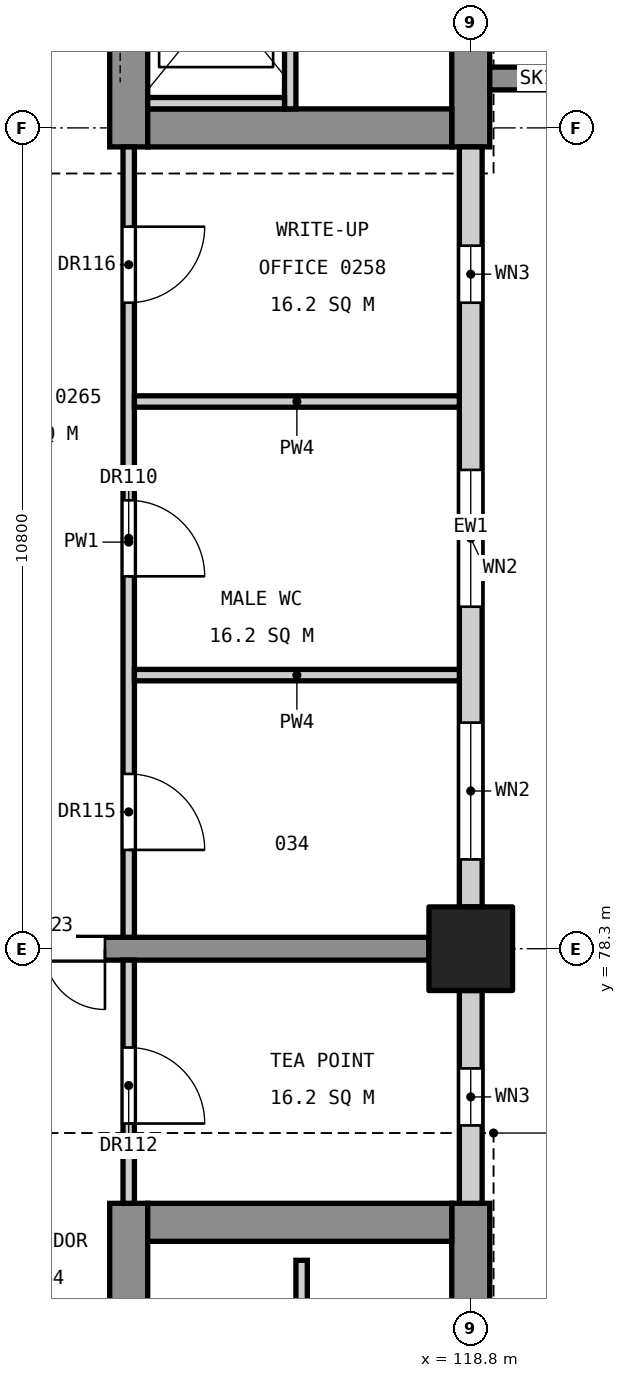
"""IFC4 building model, lengths in metres.
Left out: names, types, materials, properties, quantities, classifications, styles, units other than length and angle.
Written with IfcOpenShell. Run it as: python <this file> out.ifc"""

import sys

from ifc_helpers import new_model, si_unit, direction, frame, frame_2d, origin, origin_2d, place, context, subcontext, project, spatial, rectangle, extrude, element, fill, save


model = new_model("IFC4")
c1 = context("Model", 3, precision=1e-05, world=origin(), true_north=direction((0.0, 1.0)))
c2 = subcontext(c1, "Body", "Model", "MODEL_VIEW")
j1 = project(units=[si_unit("LENGTHUNIT", "METRE"), si_unit("PLANEANGLEUNIT", "RADIAN")], contexts=[c1])
p1 = place(None, origin())
s1 = spatial("IfcSite", under=j1, at=p1, CompositionType="ELEMENT")
p2 = place(p1, origin())
s2 = spatial("IfcBuilding", under=s1, at=p2, CompositionType="ELEMENT")
p3 = place(p2, frame((0.0, 0.0, 11.4)))
s3 = spatial("IfcBuildingStorey", under=s2, at=p3, CompositionType="ELEMENT", Elevation=11.4)
p4 = place(p3, frame((118.8, 78.3, 0.0), z_axis=(0.0, 0.0, 1.0), x_axis=(1.0, 0.0, 0.0)))
e1 = element("IfcColumn", 1, at=p4, inside=s3, PredefinedType="COLUMN", context=c2, shape_type="SweptSolid", body=[
    extrude(rectangle(XDim=1.1, YDim=1.1, at=origin_2d()), origin(), (0.0, 0.0, 1.0), 5.4),
])
p5 = place(p3, frame((118.8, 60.05, 0.0), z_axis=(0.0, 0.0, 1.0), x_axis=(0.0, 1.0, 0.0)))
e2 = element("IfcWall", 2, at=p5, inside=s3, PredefinedType="SHEAR", context=c2, shape_type="SweptSolid", body=[
    extrude(rectangle(XDim=14.9, YDim=0.5, at=frame_2d((7.45, 0.0))), origin(), (0.0, 0.0, 1.0), 5.1),
])
p6 = place(p5, frame((6.3, 0.0, 3.4)))
e3 = element("IfcOpeningElement", 3, at=p6, cuts=e2, PredefinedType="OPENING", context=c2, shape_type="SweptSolid", body=[
    extrude(rectangle(XDim=1.2, YDim=0.9, at=frame_2d((0.6, 0.45))), frame((0.0, 0.26, 0.0), z_axis=(0.0, -1.0, 0.0), x_axis=(1.0, 0.0, 0.0)), (0.0, 0.0, 1.0), 0.52),
])
p7 = place(p3, frame((114.3, 60.05, 0.0), z_axis=(0.0, 0.0, 1.0), x_axis=(0.0, 1.0, 0.0)))
e4 = element("IfcWall", 4, at=p7, inside=s3, PredefinedType="SHEAR", context=c2, shape_type="SweptSolid", body=[
    extrude(rectangle(XDim=14.9, YDim=0.5, at=frame_2d((7.45, 0.0))), origin(), (0.0, 0.0, 1.0), 5.1),
])
p8 = place(p7, frame((0.55, 0.0, 0.0)))
e5 = element("IfcOpeningElement", 5, at=p8, cuts=e4, PredefinedType="OPENING", context=c2, shape_type="SweptSolid", body=[
    extrude(rectangle(XDim=1.4, YDim=2.1, at=frame_2d((0.7, 1.05))), frame((0.0, 0.26, 0.0), z_axis=(0.0, -1.0, 0.0), x_axis=(1.0, 0.0, 0.0)), (0.0, 0.0, 1.0), 0.52),
])
p9 = place(p7, frame((8.85, 0.0, 0.0)))
e6 = element("IfcOpeningElement", 6, at=p9, cuts=e4, PredefinedType="OPENING", context=c2, shape_type="SweptSolid", body=[
    extrude(rectangle(XDim=1.1, YDim=2.1, at=frame_2d((0.55, 1.05))), frame((0.0, 0.26, 0.0), z_axis=(0.0, -1.0, 0.0), x_axis=(1.0, 0.0, 0.0)), (0.0, 0.0, 1.0), 0.52),
])
p10 = place(p7, frame((11.4, 0.0, 0.0)))
e7 = element("IfcOpeningElement", 7, at=p10, cuts=e4, PredefinedType="OPENING", context=c2, shape_type="SweptSolid", body=[
    extrude(rectangle(XDim=1.1, YDim=2.1, at=frame_2d((0.55, 1.05))), frame((0.0, 0.26, 0.0), z_axis=(0.0, -1.0, 0.0), x_axis=(1.0, 0.0, 0.0)), (0.0, 0.0, 1.0), 0.52),
])
p11 = place(p3, frame((118.55, 74.7, 0.0), z_axis=(0.0, 0.0, 1.0), x_axis=(-1.0, 0.0, 0.0)))
e8 = element("IfcWall", 8, at=p11, inside=s3, PredefinedType="SHEAR", context=c2, shape_type="SweptSolid", body=[
    extrude(rectangle(XDim=4.0, YDim=0.5, at=frame_2d((2.0, 0.0))), origin(), (0.0, 0.0, 1.0), 5.1),
])
p12 = place(p3, frame((118.8, 88.85, 0.0), z_axis=(0.0, 0.0, 1.0), x_axis=(0.0, 1.0, 0.0)))
e9 = element("IfcWall", 9, at=p12, inside=s3, PredefinedType="SHEAR", context=c2, shape_type="SweptSolid", body=[
    extrude(rectangle(XDim=11.3, YDim=0.5, at=frame_2d((5.65, 0.0))), origin(), (0.0, 0.0, 1.0), 5.1),
])
p13 = place(p12, frame((3.8, 0.0, 3.4)))
e10 = element("IfcOpeningElement", 10, at=p13, cuts=e9, PredefinedType="OPENING", context=c2, shape_type="SweptSolid", body=[
    extrude(rectangle(XDim=1.2, YDim=0.9, at=frame_2d((0.6, 0.45))), frame((0.0, 0.26, 0.0), z_axis=(0.0, -1.0, 0.0), x_axis=(1.0, 0.0, 0.0)), (0.0, 0.0, 1.0), 0.52),
])
p14 = place(p3, frame((114.3, 88.85, 0.0), z_axis=(0.0, 0.0, 1.0), x_axis=(0.0, 1.0, 0.0)))
e11 = element("IfcWall", 11, at=p14, inside=s3, PredefinedType="SHEAR", context=c2, shape_type="SweptSolid", body=[
    extrude(rectangle(XDim=11.3, YDim=0.5, at=frame_2d((5.65, 0.0))), origin(), (0.0, 0.0, 1.0), 5.1),
])
p15 = place(p14, frame((9.35, 0.0, 0.0)))
e12 = element("IfcOpeningElement", 12, at=p15, cuts=e11, PredefinedType="OPENING", context=c2, shape_type="SweptSolid", body=[
    extrude(rectangle(XDim=1.4, YDim=2.1, at=frame_2d((0.7, 1.05))), frame((0.0, 0.26, 0.0), z_axis=(0.0, -1.0, 0.0), x_axis=(1.0, 0.0, 0.0)), (0.0, 0.0, 1.0), 0.52),
])
p16 = place(p14, frame((1.4, 0.0, 0.0)))
e13 = element("IfcOpeningElement", 13, at=p16, cuts=e11, PredefinedType="OPENING", context=c2, shape_type="SweptSolid", body=[
    extrude(rectangle(XDim=1.1, YDim=2.1, at=frame_2d((0.55, 1.05))), frame((0.0, 0.26, 0.0), z_axis=(0.0, -1.0, 0.0), x_axis=(1.0, 0.0, 0.0)), (0.0, 0.0, 1.0), 0.52),
])
p17 = place(p3, frame((118.55, 89.1, 0.0), z_axis=(0.0, 0.0, 1.0), x_axis=(-1.0, 0.0, 0.0)))
e14 = element("IfcWall", 14, at=p17, inside=s3, PredefinedType="SHEAR", context=c2, shape_type="SweptSolid", body=[
    extrude(rectangle(XDim=4.0, YDim=0.5, at=frame_2d((2.0, 0.0))), origin(), (0.0, 0.0, 1.0), 5.1),
])
p18 = place(p3, frame((119.05, 89.75, 0.0), z_axis=(0.0, 0.0, 1.0), x_axis=(1.0, 0.0, 0.0)))
e15 = element("IfcWall", 15, at=p18, inside=s3, PredefinedType="SHEAR", context=c2, shape_type="SweptSolid", body=[
    extrude(rectangle(XDim=1.25, YDim=0.3, at=frame_2d((0.625, 0.0))), origin(), (0.0, 0.0, 1.0), 5.4),
])
p19 = place(p3, frame((118.25, 78.3, 0.0), z_axis=(0.0, 0.0, 1.0), x_axis=(-1.0, 0.0, 0.0)))
e16 = element("IfcWall", 16, at=p19, inside=s3, PredefinedType="SHEAR", context=c2, shape_type="SweptSolid", body=[
    extrude(rectangle(XDim=6.1, YDim=0.3, at=frame_2d((3.05, 0.0))), origin(), (0.0, 0.0, 1.0), 5.1),
])
p20 = place(p19, frame((4.262, 0.0, 0.0)))
e17 = element("IfcOpeningElement", 17, at=p20, cuts=e16, PredefinedType="OPENING", context=c2, shape_type="SweptSolid", body=[
    extrude(rectangle(XDim=1.6, YDim=2.1, at=frame_2d((0.8, 1.05))), frame((0.0, 0.16, 0.0), z_axis=(0.0, -1.0, 0.0), x_axis=(1.0, 0.0, 0.0)), (0.0, 0.0, 1.0), 0.32),
])
p21 = place(p3, frame((116.425, 92.0, 0.0), z_axis=(0.0, 0.0, 1.0), x_axis=(0.0, -1.0, 0.0)))
e18 = element("IfcWall", 18, at=p21, inside=s3, PredefinedType="SOLIDWALL", context=c2, shape_type="SweptSolid", body=[
    extrude(rectangle(XDim=2.65, YDim=0.15, at=frame_2d((1.325, 0.0))), origin(), (0.0, 0.0, 1.0), 5.4),
])
p22 = place(p3, frame((116.35, 89.425, 0.0), z_axis=(0.0, 0.0, 1.0), x_axis=(-1.0, 0.0, 0.0)))
e19 = element("IfcWall", 19, at=p22, inside=s3, PredefinedType="SOLIDWALL", context=c2, shape_type="SweptSolid", body=[
    extrude(rectangle(XDim=1.8, YDim=0.15, at=frame_2d((0.9, 0.0))), origin(), (0.0, 0.0, 1.0), 5.4),
])
p23 = place(p3, frame((116.575, 73.3, 0.0), z_axis=(0.0, 0.0, 1.0), x_axis=(0.0, 1.0, 0.0)))
e20 = element("IfcWall", 20, at=p23, inside=s3, PredefinedType="SOLIDWALL", context=c2, shape_type="SweptSolid", body=[
    extrude(rectangle(XDim=0.9, YDim=0.15, at=frame_2d((0.45, 0.0))), origin(), (0.0, 0.0, 1.0), 5.4),
])
p24 = place(p3, frame((118.8, 74.95, 0.0), z_axis=(0.0, 0.0, 1.0), x_axis=(0.0, 1.0, 0.0)))
e21 = element("IfcWall", 21, at=p24, inside=s3, PredefinedType="STANDARD", context=c2, shape_type="SweptSolid", body=[
    extrude(rectangle(XDim=2.8, YDim=0.3, at=frame_2d((1.4, 0.0))), origin(), (0.0, 0.0, 1.0), 4.1),
])
p25 = place(p24, frame((1.025, 0.0, 0.8)))
e22 = element("IfcOpeningElement", 22, at=p25, cuts=e21, PredefinedType="OPENING", context=c2, shape_type="SweptSolid", body=[
    extrude(rectangle(XDim=0.75, YDim=1.2, at=frame_2d((0.375, 0.6))), frame((0.0, 0.16, 0.0), z_axis=(0.0, -1.0, 0.0), x_axis=(1.0, 0.0, 0.0)), (0.0, 0.0, 1.0), 0.32),
])
p26 = place(p3, frame((118.8, 78.85, 0.0), z_axis=(0.0, 0.0, 1.0), x_axis=(0.0, 1.0, 0.0)))
e23 = element("IfcWall", 23, at=p26, inside=s3, PredefinedType="STANDARD", context=c2, shape_type="SweptSolid", body=[
    extrude(rectangle(XDim=10.0, YDim=0.3, at=frame_2d((5.0, 0.0))), origin(), (0.0, 0.0, 1.0), 4.1),
])
p27 = place(p26, frame((0.625, 0.0, 0.9)))
e24 = element("IfcOpeningElement", 24, at=p27, cuts=e23, PredefinedType="OPENING", context=c2, shape_type="SweptSolid", body=[
    extrude(rectangle(XDim=1.8, YDim=3.0, at=frame_2d((0.9, 1.5))), frame((0.0, 0.16, 0.0), z_axis=(0.0, -1.0, 0.0), x_axis=(1.0, 0.0, 0.0)), (0.0, 0.0, 1.0), 0.32),
])
p28 = place(p26, frame((3.95, 0.0, 0.9)))
e25 = element("IfcOpeningElement", 25, at=p28, cuts=e23, PredefinedType="OPENING", context=c2, shape_type="SweptSolid", body=[
    extrude(rectangle(XDim=1.8, YDim=3.0, at=frame_2d((0.9, 1.5))), frame((0.0, 0.16, 0.0), z_axis=(0.0, -1.0, 0.0), x_axis=(1.0, 0.0, 0.0)), (0.0, 0.0, 1.0), 0.32),
])
p29 = place(p26, frame((7.95, 0.0, 0.8)))
e26 = element("IfcOpeningElement", 26, at=p29, cuts=e23, PredefinedType="OPENING", context=c2, shape_type="SweptSolid", body=[
    extrude(rectangle(XDim=0.75, YDim=1.2, at=frame_2d((0.375, 0.6))), frame((0.0, 0.16, 0.0), z_axis=(0.0, -1.0, 0.0), x_axis=(1.0, 0.0, 0.0)), (0.0, 0.0, 1.0), 0.32),
])
p30 = place(p3, frame((114.3, 74.95, 0.0), z_axis=(0.0, 0.0, 1.0), x_axis=(0.0, 1.0, 0.0)))
e27 = element("IfcWall", 27, at=p30, inside=s3, PredefinedType="PARTITIONING", context=c2, shape_type="SweptSolid", body=[
    extrude(rectangle(XDim=3.2, YDim=0.15, at=frame_2d((1.6, 0.0))), origin(), (0.0, 0.0, 1.0), 4.0),
])
p31 = place(p30, frame((1.05, 0.0, 0.0)))
e28 = element("IfcOpeningElement", 28, at=p31, cuts=e27, PredefinedType="OPENING", context=c2, shape_type="SweptSolid", body=[
    extrude(rectangle(XDim=1.0, YDim=2.1, at=frame_2d((0.5, 1.05))), frame((0.0, 0.085, 0.0), z_axis=(0.0, -1.0, 0.0), x_axis=(1.0, 0.0, 0.0)), (0.0, 0.0, 1.0), 0.17),
])
p32 = place(p3, frame((114.3, 78.45, 0.0), z_axis=(0.0, 0.0, 1.0), x_axis=(0.0, 1.0, 0.0)))
e29 = element("IfcWall", 29, at=p32, inside=s3, PredefinedType="PARTITIONING", context=c2, shape_type="SweptSolid", body=[
    extrude(rectangle(XDim=10.4, YDim=0.15, at=frame_2d((5.2, 0.0))), origin(), (0.0, 0.0, 1.0), 4.0),
])
p33 = place(p32, frame((4.75, 0.0, 0.0)))
e30 = element("IfcOpeningElement", 30, at=p33, cuts=e29, PredefinedType="OPENING", context=c2, shape_type="SweptSolid", body=[
    extrude(rectangle(XDim=1.0, YDim=2.1, at=frame_2d((0.5, 1.05))), frame((0.0, 0.085, 0.0), z_axis=(0.0, -1.0, 0.0), x_axis=(1.0, 0.0, 0.0)), (0.0, 0.0, 1.0), 0.17),
])
p34 = place(p32, frame((1.15, 0.0, 0.0)))
e31 = element("IfcOpeningElement", 31, at=p34, cuts=e29, PredefinedType="OPENING", context=c2, shape_type="SweptSolid", body=[
    extrude(rectangle(XDim=1.0, YDim=2.1, at=frame_2d((0.5, 1.05))), frame((0.0, 0.085, 0.0), z_axis=(0.0, -1.0, 0.0), x_axis=(1.0, 0.0, 0.0)), (0.0, 0.0, 1.0), 0.17),
])
p35 = place(p32, frame((8.35, 0.0, 0.0)))
e32 = element("IfcOpeningElement", 32, at=p35, cuts=e29, PredefinedType="OPENING", context=c2, shape_type="SweptSolid", body=[
    extrude(rectangle(XDim=1.0, YDim=2.1, at=frame_2d((0.5, 1.05))), frame((0.0, 0.085, 0.0), z_axis=(0.0, -1.0, 0.0), x_axis=(1.0, 0.0, 0.0)), (0.0, 0.0, 1.0), 0.17),
])
for number, where, z_axis, x_axis in (
    (33, (118.65, 81.9, 0.0), (0.0, 0.0, 1.0), (-1.0, 0.0, 0.0)),
    (34, (118.65, 85.5, 0.0), (0.0, 0.0, 1.0), (-1.0, 0.0, 0.0)),
):
    element("IfcWall", number, at=place(p3, frame(where, z_axis=z_axis, x_axis=x_axis)), inside=s3, PredefinedType="PARTITIONING", context=c2, shape_type="SweptSolid", body=[
        extrude(rectangle(XDim=4.275, YDim=0.15, at=frame_2d((2.137, 0.0))), origin(), (0.0, 0.0, 1.0), 4.3),
    ])
p36 = place(p25, origin())
e35 = element("IfcWindow", 35, at=p36, inside=s3, PartitioningType="SINGLE_PANEL", PredefinedType="WINDOW", context=c2, shape_type="SweptSolid", body=[
    extrude(rectangle(XDim=0.75, YDim=1.2, at=frame_2d((0.375, 0.6))), frame((0.0, 0.03, 0.0), z_axis=(0.0, -1.0, 0.0), x_axis=(1.0, 0.0, 0.0)), (0.0, 0.0, 1.0), 0.06),
])
fill(e22, e35)
p37 = place(p27, origin())
e36 = element("IfcWindow", 36, at=p37, inside=s3, PartitioningType="SINGLE_PANEL", PredefinedType="WINDOW", context=c2, shape_type="SweptSolid", body=[
    extrude(rectangle(XDim=1.8, YDim=3.0, at=frame_2d((0.9, 1.5))), frame((0.0, 0.03, 0.0), z_axis=(0.0, -1.0, 0.0), x_axis=(1.0, 0.0, 0.0)), (0.0, 0.0, 1.0), 0.06),
])
fill(e24, e36)
p38 = place(p28, origin())
e37 = element("IfcWindow", 37, at=p38, inside=s3, PartitioningType="SINGLE_PANEL", PredefinedType="WINDOW", context=c2, shape_type="SweptSolid", body=[
    extrude(rectangle(XDim=1.8, YDim=3.0, at=frame_2d((0.9, 1.5))), frame((0.0, 0.03, 0.0), z_axis=(0.0, -1.0, 0.0), x_axis=(1.0, 0.0, 0.0)), (0.0, 0.0, 1.0), 0.06),
])
fill(e25, e37)
p39 = place(p29, origin())
e38 = element("IfcWindow", 38, at=p39, inside=s3, PartitioningType="SINGLE_PANEL", PredefinedType="WINDOW", context=c2, shape_type="SweptSolid", body=[
    extrude(rectangle(XDim=0.75, YDim=1.2, at=frame_2d((0.375, 0.6))), frame((0.0, 0.03, 0.0), z_axis=(0.0, -1.0, 0.0), x_axis=(1.0, 0.0, 0.0)), (0.0, 0.0, 1.0), 0.06),
])
fill(e26, e38)
p40 = place(p33, frame((1.0, 0.0, 0.0), z_axis=(0.0, 0.0, 1.0), x_axis=(-1.0, 0.0, 0.0)))
e39 = element("IfcDoor", 39, at=p40, inside=s3, OperationType="SINGLE_SWING_RIGHT", PredefinedType="DOOR", context=c2, shape_type="SweptSolid", body=[
    extrude(rectangle(XDim=1.0, YDim=2.1, at=frame_2d((0.5, 1.05))), frame((0.0, 0.025, 0.0), z_axis=(0.0, -1.0, 0.0), x_axis=(1.0, 0.0, 0.0)), (0.0, 0.0, 1.0), 0.05),
])
fill(e30, e39)
p41 = place(p31, frame((1.0, 0.0, 0.0), z_axis=(0.0, 0.0, 1.0), x_axis=(-1.0, 0.0, 0.0)))
e40 = element("IfcDoor", 40, at=p41, inside=s3, OperationType="SINGLE_SWING_RIGHT", PredefinedType="DOOR", context=c2, shape_type="SweptSolid", body=[
    extrude(rectangle(XDim=1.0, YDim=2.1, at=frame_2d((0.5, 1.05))), frame((0.0, 0.025, 0.0), z_axis=(0.0, -1.0, 0.0), x_axis=(1.0, 0.0, 0.0)), (0.0, 0.0, 1.0), 0.05),
])
fill(e28, e40)
p42 = place(p34, frame((1.0, 0.0, 0.0), z_axis=(0.0, 0.0, 1.0), x_axis=(-1.0, 0.0, 0.0)))
e41 = element("IfcDoor", 41, at=p42, inside=s3, OperationType="SINGLE_SWING_RIGHT", PredefinedType="DOOR", context=c2, shape_type="SweptSolid", body=[
    extrude(rectangle(XDim=1.0, YDim=2.1, at=frame_2d((0.5, 1.05))), frame((0.0, 0.025, 0.0), z_axis=(0.0, -1.0, 0.0), x_axis=(1.0, 0.0, 0.0)), (0.0, 0.0, 1.0), 0.05),
])
fill(e31, e41)
p43 = place(p35, frame((1.0, 0.0, 0.0), z_axis=(0.0, 0.0, 1.0), x_axis=(-1.0, 0.0, 0.0)))
e42 = element("IfcDoor", 42, at=p43, inside=s3, OperationType="SINGLE_SWING_LEFT", PredefinedType="DOOR", context=c2, shape_type="SweptSolid", body=[
    extrude(rectangle(XDim=1.0, YDim=2.1, at=frame_2d((0.5, 1.05))), frame((0.0, 0.025, 0.0), z_axis=(0.0, -1.0, 0.0), x_axis=(1.0, 0.0, 0.0)), (0.0, 0.0, 1.0), 0.05),
])
fill(e32, e42)
p44 = place(p20, origin())
e43 = element("IfcDoor", 43, at=p44, inside=s3, OperationType="DOUBLE_DOOR_SINGLE_SWING", PredefinedType="DOOR", context=c2, shape_type="SweptSolid", body=[
    extrude(rectangle(XDim=1.6, YDim=2.1, at=frame_2d((0.8, 1.05))), frame((0.0, 0.025, 0.0), z_axis=(0.0, -1.0, 0.0), x_axis=(1.0, 0.0, 0.0)), (0.0, 0.0, 1.0), 0.05),
])
fill(e17, e43)
save(model, sys.argv[1])
